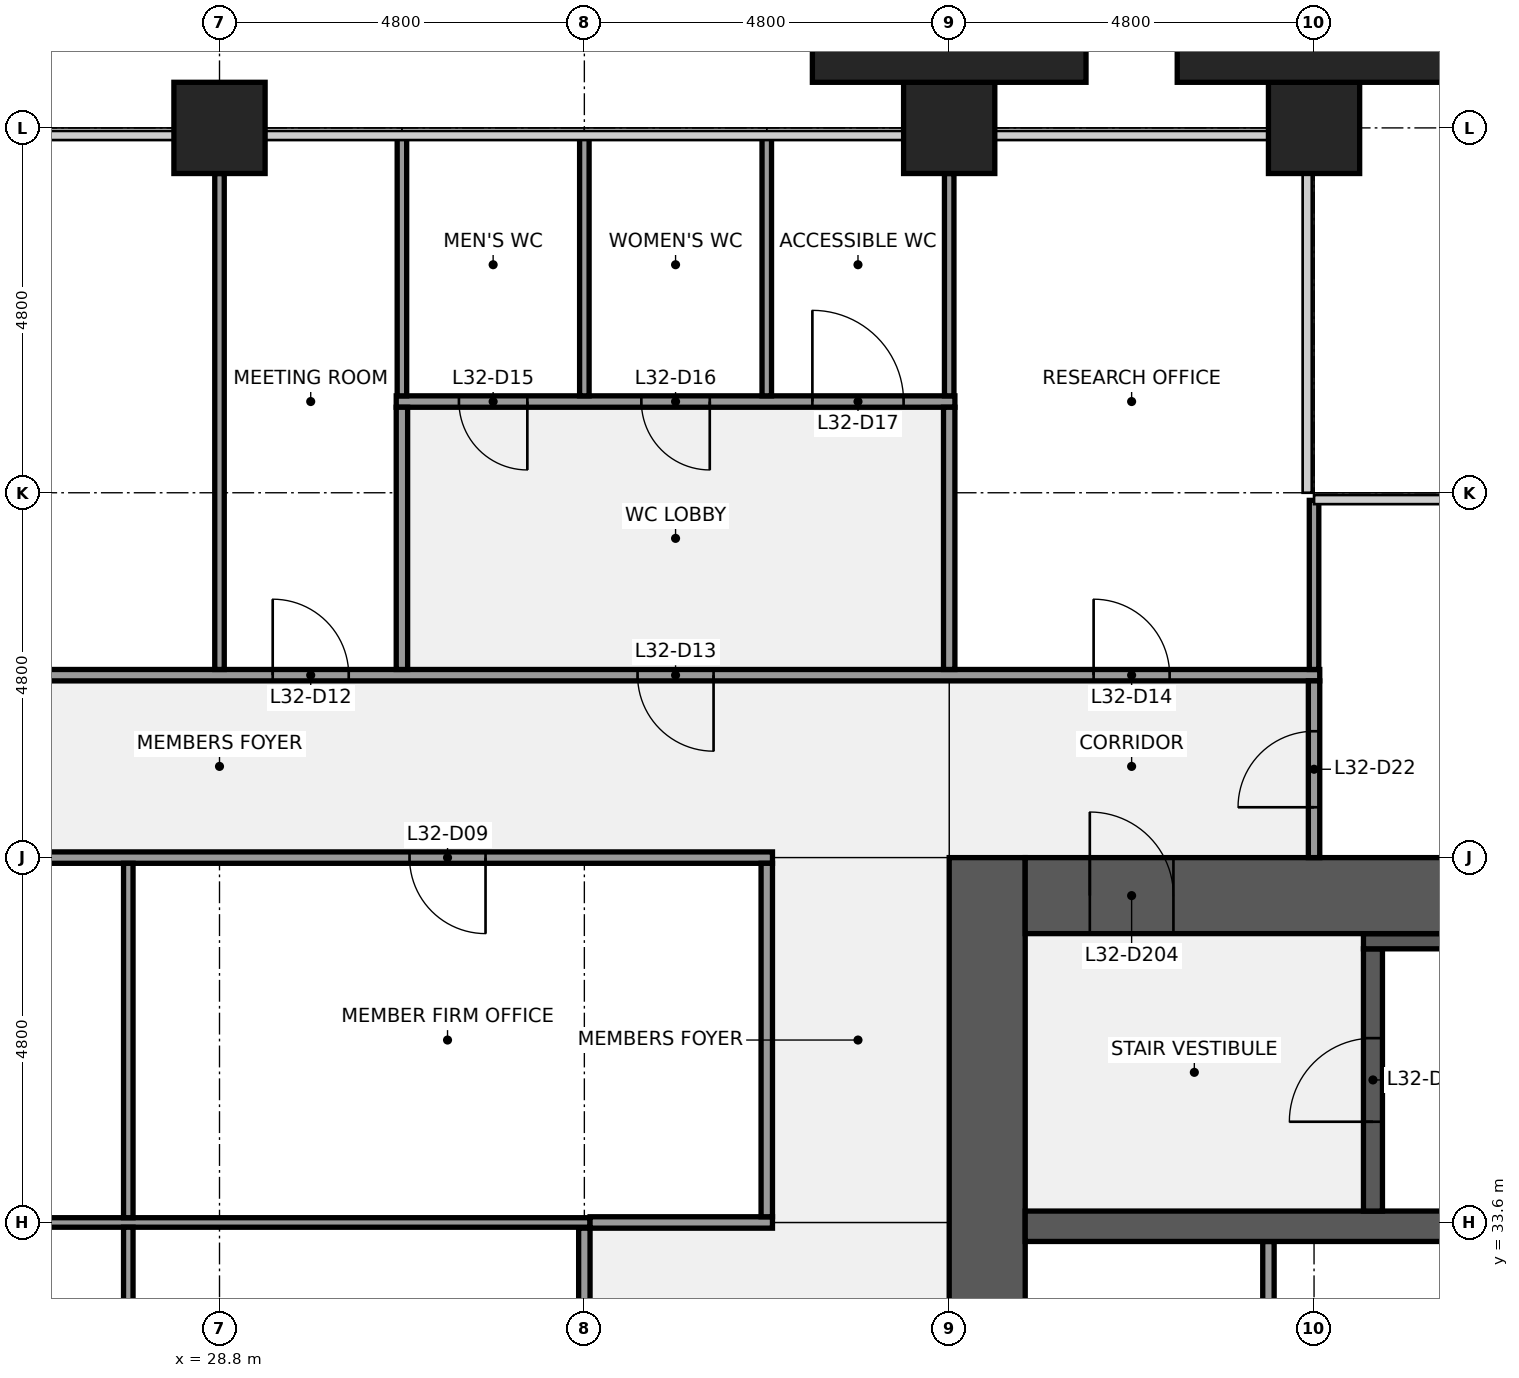
"""IFC4 building model, lengths in metres.
Left out: names, types, materials, properties, quantities, classifications, styles, units other than length and angle.
Written with IfcOpenShell. Run it as: python <this file> out.ifc"""

import sys

from ifc_helpers import new_model, si_unit, direction, frame, frame_2d, origin, origin_2d, place, context, subcontext, project, spatial, rectangle, extrude, element, fill, save


model = new_model("IFC4")
c1 = context("Model", 3, precision=1e-05, world=origin(), true_north=direction((0.0, 1.0)))
c2 = subcontext(c1, "Body", "Model", "MODEL_VIEW")
j1 = project(units=[si_unit("LENGTHUNIT", "METRE"), si_unit("PLANEANGLEUNIT", "RADIAN")], contexts=[c1])
p1 = place(None, origin())
s1 = spatial("IfcSite", under=j1, at=p1, CompositionType="ELEMENT")
p2 = place(p1, origin())
s2 = spatial("IfcBuilding", under=s1, at=p2, CompositionType="ELEMENT")
p3 = place(p2, frame((0.0, 0.0, 148.1)))
s3 = spatial("IfcBuildingStorey", under=s2, at=p3, CompositionType="ELEMENT", Elevation=148.1)
for number, where, z_axis, x_axis in (
    (1, (28.8, 48.0, 0.0), (0.0, 0.0, 1.0), (1.0, 0.0, 0.0)),
    (2, (38.4, 48.0, 0.0), (0.0, 0.0, 1.0), (1.0, 0.0, 0.0)),
    (3, (43.2, 48.0, 0.0), (0.0, 0.0, 1.0), (1.0, 0.0, 0.0)),
):
    element("IfcColumn", number, at=place(p3, frame(where, z_axis=z_axis, x_axis=x_axis)), inside=s3, PredefinedType="COLUMN", context=c2, shape_type="SweptSolid", body=[
        extrude(rectangle(XDim=1.2, YDim=1.2, at=origin_2d()), origin(), (0.0, 0.0, 1.0), 4.0),
    ])
p4 = place(p3, frame((38.9, 9.6, 0.0), z_axis=(0.0, 0.0, 1.0), x_axis=(0.0, 1.0, 0.0)))
e4 = element("IfcWall", 4, at=p4, inside=s3, PredefinedType="SHEAR", context=c2, shape_type="SweptSolid", body=[
    extrude(rectangle(XDim=28.8, YDim=1.0, at=frame_2d((14.4, 0.0))), origin(), (0.0, 0.0, 1.0), 3.84),
])
p5 = place(p4, frame((8.7, 0.0, 0.0)))
e5 = element("IfcOpeningElement", 5, at=p5, cuts=e4, PredefinedType="OPENING", context=c2, shape_type="SweptSolid", body=[
    extrude(rectangle(XDim=1.8, YDim=2.1, at=frame_2d((0.9, 1.05))), frame((0.0, 0.51, 0.0), z_axis=(0.0, -1.0, 0.0), x_axis=(1.0, 0.0, 0.0)), (0.0, 0.0, 1.0), 1.02),
])
p6 = place(p4, frame((18.3, 0.0, 0.0)))
e6 = element("IfcOpeningElement", 6, at=p6, cuts=e4, PredefinedType="OPENING", context=c2, shape_type="SweptSolid", body=[
    extrude(rectangle(XDim=1.8, YDim=2.1, at=frame_2d((0.9, 1.05))), frame((0.0, 0.51, 0.0), z_axis=(0.0, -1.0, 0.0), x_axis=(1.0, 0.0, 0.0)), (0.0, 0.0, 1.0), 1.02),
])
p7 = place(p3, frame((42.6, 30.75, 0.0), z_axis=(0.0, 0.0, 1.0), x_axis=(0.0, 1.0, 0.0)))
e7 = element("IfcWall", 7, at=p7, inside=s3, PredefinedType="PARTITIONING", context=c2, shape_type="SweptSolid", body=[
    extrude(rectangle(XDim=2.6, YDim=0.15, at=frame_2d((1.3, 0.0))), origin(), (0.0, 0.0, 1.0), 3.84),
])
p8 = place(p3, frame((39.4, 33.55, 0.0), z_axis=(0.0, 0.0, 1.0), x_axis=(1.0, 0.0, 0.0)))
e8 = element("IfcWall", 8, at=p8, inside=s3, PredefinedType="SHEAR", context=c2, shape_type="SweptSolid", body=[
    extrude(rectangle(XDim=17.2, YDim=0.4, at=frame_2d((8.6, 0.0))), origin(), (0.0, 0.0, 1.0), 3.84),
])
p9 = place(p3, frame((43.975, 33.75, 0.0), z_axis=(0.0, 0.0, 1.0), x_axis=(0.0, 1.0, 0.0)))
e9 = element("IfcWall", 9, at=p9, inside=s3, PredefinedType="SHEAR", context=c2, shape_type="SweptSolid", body=[
    extrude(rectangle(XDim=3.45, YDim=0.25, at=frame_2d((1.725, 0.0))), origin(), (0.0, 0.0, 1.0), 3.84),
])
p10 = place(p9, frame((1.175, 0.0, 0.0)))
e10 = element("IfcOpeningElement", 10, at=p10, cuts=e9, PredefinedType="OPENING", context=c2, shape_type="SweptSolid", body=[
    extrude(rectangle(XDim=1.1, YDim=2.1, at=frame_2d((0.55, 1.05))), frame((0.0, 0.135, 0.0), z_axis=(0.0, -1.0, 0.0), x_axis=(1.0, 0.0, 0.0)), (0.0, 0.0, 1.0), 0.27),
])
p11 = place(p3, frame((43.85, 37.3, 0.0), z_axis=(0.0, 0.0, 1.0), x_axis=(1.0, 0.0, 0.0)))
e11 = element("IfcWall", 11, at=p11, inside=s3, PredefinedType="SHEAR", context=c2, shape_type="SweptSolid", body=[
    extrude(rectangle(XDim=4.15, YDim=0.2, at=frame_2d((2.075, 0.0))), origin(), (0.0, 0.0, 1.0), 3.84),
])
p12 = place(p3, frame((39.4, 37.9, 0.0), z_axis=(0.0, 0.0, 1.0), x_axis=(1.0, 0.0, 0.0)))
e12 = element("IfcWall", 12, at=p12, inside=s3, PredefinedType="SHEAR", context=c2, shape_type="SweptSolid", body=[
    extrude(rectangle(XDim=8.6, YDim=1.0, at=frame_2d((4.3, 0.0))), origin(), (0.0, 0.0, 1.0), 3.84),
])
p13 = place(p12, frame((0.85, 0.0, 0.0)))
e13 = element("IfcOpeningElement", 13, at=p13, cuts=e12, PredefinedType="OPENING", context=c2, shape_type="SweptSolid", body=[
    extrude(rectangle(XDim=1.1, YDim=2.1, at=frame_2d((0.55, 1.05))), frame((0.0, 0.51, 0.0), z_axis=(0.0, -1.0, 0.0), x_axis=(1.0, 0.0, 0.0)), (0.0, 0.0, 1.0), 1.02),
])
p14 = place(p3, frame((24.075, 33.6, 0.0), z_axis=(0.0, 0.0, 1.0), x_axis=(1.0, 0.0, 0.0)))
e14 = element("IfcWall", 14, at=p14, inside=s3, PredefinedType="PARTITIONING", context=c2, shape_type="SweptSolid", body=[
    extrude(rectangle(XDim=9.6, YDim=0.125, at=frame_2d((4.8, 0.0))), origin(), (0.0, 0.0, 1.0), 2.849),
])
p15 = place(p3, frame((33.675, 33.6, 0.0), z_axis=(0.0, 0.0, 1.0), x_axis=(1.0, 0.0, 0.0)))
e15 = element("IfcWall", 15, at=p15, inside=s3, PredefinedType="PARTITIONING", context=c2, shape_type="SweptSolid", body=[
    extrude(rectangle(XDim=2.4, YDim=0.15, at=frame_2d((1.2, 0.0))), origin(), (0.0, 0.0, 1.0), 2.849),
])
p16 = place(p3, frame((21.525, 38.4, 0.0), z_axis=(0.0, 0.0, 1.0), x_axis=(1.0, 0.0, 0.0)))
e16 = element("IfcWall", 16, at=p16, inside=s3, PredefinedType="PARTITIONING", context=c2, shape_type="SweptSolid", body=[
    extrude(rectangle(XDim=14.55, YDim=0.15, at=frame_2d((7.275, 0.0))), origin(), (0.0, 0.0, 1.0), 2.849),
])
p17 = place(p16, frame((2.575, 0.0, 0.0)))
e17 = element("IfcOpeningElement", 17, at=p17, cuts=e16, PredefinedType="OPENING", context=c2, shape_type="SweptSolid", body=[
    extrude(rectangle(XDim=1.0, YDim=2.1, at=frame_2d((0.5, 1.05))), frame((0.0, 0.085, 0.0), z_axis=(0.0, -1.0, 0.0), x_axis=(1.0, 0.0, 0.0)), (0.0, 0.0, 1.0), 0.17),
])
p18 = place(p16, frame((9.775, 0.0, 0.0)))
e18 = element("IfcOpeningElement", 18, at=p18, cuts=e16, PredefinedType="OPENING", context=c2, shape_type="SweptSolid", body=[
    extrude(rectangle(XDim=1.0, YDim=2.1, at=frame_2d((0.5, 1.05))), frame((0.0, 0.085, 0.0), z_axis=(0.0, -1.0, 0.0), x_axis=(1.0, 0.0, 0.0)), (0.0, 0.0, 1.0), 0.17),
])
p19 = place(p3, frame((14.325, 40.8, 0.0), z_axis=(0.0, 0.0, 1.0), x_axis=(1.0, 0.0, 0.0)))
e19 = element("IfcWall", 19, at=p19, inside=s3, PredefinedType="PARTITIONING", context=c2, shape_type="SweptSolid", body=[
    extrude(rectangle(XDim=28.95, YDim=0.15, at=frame_2d((14.475, 0.0))), origin(), (0.0, 0.0, 1.0), 2.849),
])
p20 = place(p19, frame((1.975, 0.0, 0.0)))
e20 = element("IfcOpeningElement", 20, at=p20, cuts=e19, PredefinedType="OPENING", context=c2, shape_type="SweptSolid", body=[
    extrude(rectangle(XDim=1.0, YDim=2.1, at=frame_2d((0.5, 1.05))), frame((0.0, 0.085, 0.0), z_axis=(0.0, -1.0, 0.0), x_axis=(1.0, 0.0, 0.0)), (0.0, 0.0, 1.0), 0.17),
])
p21 = place(p19, frame((9.175, 0.0, 0.0)))
e21 = element("IfcOpeningElement", 21, at=p21, cuts=e19, PredefinedType="OPENING", context=c2, shape_type="SweptSolid", body=[
    extrude(rectangle(XDim=1.0, YDim=2.1, at=frame_2d((0.5, 1.05))), frame((0.0, 0.085, 0.0), z_axis=(0.0, -1.0, 0.0), x_axis=(1.0, 0.0, 0.0)), (0.0, 0.0, 1.0), 0.17),
])
p22 = place(p19, frame((15.175, 0.0, 0.0)))
e22 = element("IfcOpeningElement", 22, at=p22, cuts=e19, PredefinedType="OPENING", context=c2, shape_type="SweptSolid", body=[
    extrude(rectangle(XDim=1.0, YDim=2.1, at=frame_2d((0.5, 1.05))), frame((0.0, 0.085, 0.0), z_axis=(0.0, -1.0, 0.0), x_axis=(1.0, 0.0, 0.0)), (0.0, 0.0, 1.0), 0.17),
])
p23 = place(p19, frame((19.975, 0.0, 0.0)))
e23 = element("IfcOpeningElement", 23, at=p23, cuts=e19, PredefinedType="OPENING", context=c2, shape_type="SweptSolid", body=[
    extrude(rectangle(XDim=1.0, YDim=2.1, at=frame_2d((0.5, 1.05))), frame((0.0, 0.085, 0.0), z_axis=(0.0, -1.0, 0.0), x_axis=(1.0, 0.0, 0.0)), (0.0, 0.0, 1.0), 0.17),
])
p24 = place(p19, frame((25.975, 0.0, 0.0)))
e24 = element("IfcOpeningElement", 24, at=p24, cuts=e19, PredefinedType="OPENING", context=c2, shape_type="SweptSolid", body=[
    extrude(rectangle(XDim=1.0, YDim=2.1, at=frame_2d((0.5, 1.05))), frame((0.0, 0.085, 0.0), z_axis=(0.0, -1.0, 0.0), x_axis=(1.0, 0.0, 0.0)), (0.0, 0.0, 1.0), 0.17),
])
p25 = place(p3, frame((31.125, 44.4, 0.0), z_axis=(0.0, 0.0, 1.0), x_axis=(1.0, 0.0, 0.0)))
e25 = element("IfcWall", 25, at=p25, inside=s3, PredefinedType="PARTITIONING", context=c2, shape_type="SweptSolid", body=[
    extrude(rectangle(XDim=7.35, YDim=0.15, at=frame_2d((3.675, 0.0))), origin(), (0.0, 0.0, 1.0), 2.849),
])
p26 = place(p25, frame((0.825, 0.0, 0.0)))
e26 = element("IfcOpeningElement", 26, at=p26, cuts=e25, PredefinedType="OPENING", context=c2, shape_type="SweptSolid", body=[
    extrude(rectangle(XDim=0.9, YDim=2.1, at=frame_2d((0.45, 1.05))), frame((0.0, 0.085, 0.0), z_axis=(0.0, -1.0, 0.0), x_axis=(1.0, 0.0, 0.0)), (0.0, 0.0, 1.0), 0.17),
])
p27 = place(p25, frame((3.225, 0.0, 0.0)))
e27 = element("IfcOpeningElement", 27, at=p27, cuts=e25, PredefinedType="OPENING", context=c2, shape_type="SweptSolid", body=[
    extrude(rectangle(XDim=0.9, YDim=2.1, at=frame_2d((0.45, 1.05))), frame((0.0, 0.085, 0.0), z_axis=(0.0, -1.0, 0.0), x_axis=(1.0, 0.0, 0.0)), (0.0, 0.0, 1.0), 0.17),
])
p28 = place(p25, frame((5.475, 0.0, 0.0)))
e28 = element("IfcOpeningElement", 28, at=p28, cuts=e25, PredefinedType="OPENING", context=c2, shape_type="SweptSolid", body=[
    extrude(rectangle(XDim=1.2, YDim=2.1, at=frame_2d((0.6, 1.05))), frame((0.0, 0.085, 0.0), z_axis=(0.0, -1.0, 0.0), x_axis=(1.0, 0.0, 0.0)), (0.0, 0.0, 1.0), 0.17),
])
p29 = place(p3, frame((27.6, 21.675, 0.0), z_axis=(0.0, 0.0, 1.0), x_axis=(0.0, 1.0, 0.0)))
e29 = element("IfcWall", 29, at=p29, inside=s3, PredefinedType="PARTITIONING", context=c2, shape_type="SweptSolid", body=[
    extrude(rectangle(XDim=11.863, YDim=0.125, at=frame_2d((5.931, 0.0))), origin(), (0.0, 0.0, 1.0), 2.849),
])
p30 = place(p3, frame((27.6, 33.663, 0.0), z_axis=(0.0, 0.0, 1.0), x_axis=(0.0, 1.0, 0.0)))
e30 = element("IfcWall", 30, at=p30, inside=s3, PredefinedType="PARTITIONING", context=c2, shape_type="SweptSolid", body=[
    extrude(rectangle(XDim=4.662, YDim=0.125, at=frame_2d((2.331, 0.0))), origin(), (0.0, 0.0, 1.0), 2.849),
])
p31 = place(p3, frame((28.8, 40.875, 0.0), z_axis=(0.0, 0.0, 1.0), x_axis=(0.0, 1.0, 0.0)))
e31 = element("IfcWall", 31, at=p31, inside=s3, PredefinedType="PARTITIONING", context=c2, shape_type="SweptSolid", body=[
    extrude(rectangle(XDim=6.525, YDim=0.125, at=frame_2d((3.262, 0.0))), origin(), (0.0, 0.0, 1.0), 2.849),
])
p32 = place(p3, frame((31.2, 44.475, 0.0), z_axis=(0.0, 0.0, 1.0), x_axis=(0.0, 1.0, 0.0)))
e32 = element("IfcWall", 32, at=p32, inside=s3, PredefinedType="PARTITIONING", context=c2, shape_type="SweptSolid", body=[
    extrude(rectangle(XDim=3.425, YDim=0.125, at=frame_2d((1.712, 0.0))), origin(), (0.0, 0.0, 1.0), 2.849),
])
p33 = place(p3, frame((31.2, 40.875, 0.0), z_axis=(0.0, 0.0, 1.0), x_axis=(0.0, 1.0, 0.0)))
e33 = element("IfcWall", 33, at=p33, inside=s3, PredefinedType="PARTITIONING", context=c2, shape_type="SweptSolid", body=[
    extrude(rectangle(XDim=3.45, YDim=0.15, at=frame_2d((1.725, 0.0))), origin(), (0.0, 0.0, 1.0), 2.849),
])
p34 = place(p3, frame((33.6, 44.475, 0.0), z_axis=(0.0, 0.0, 1.0), x_axis=(0.0, 1.0, 0.0)))
e34 = element("IfcWall", 34, at=p34, inside=s3, PredefinedType="PARTITIONING", context=c2, shape_type="SweptSolid", body=[
    extrude(rectangle(XDim=3.425, YDim=0.125, at=frame_2d((1.712, 0.0))), origin(), (0.0, 0.0, 1.0), 2.849),
])
p35 = place(p3, frame((33.6, 21.675, 0.0), z_axis=(0.0, 0.0, 1.0), x_axis=(0.0, 1.0, 0.0)))
e35 = element("IfcWall", 35, at=p35, inside=s3, PredefinedType="PARTITIONING", context=c2, shape_type="SweptSolid", body=[
    extrude(rectangle(XDim=11.85, YDim=0.15, at=frame_2d((5.925, 0.0))), origin(), (0.0, 0.0, 1.0), 2.849),
])
p36 = place(p35, frame((5.425, 0.0, 0.0)))
e36 = element("IfcOpeningElement", 36, at=p36, cuts=e35, PredefinedType="OPENING", context=c2, shape_type="SweptSolid", body=[
    extrude(rectangle(XDim=1.0, YDim=2.1, at=frame_2d((0.5, 1.05))), frame((0.0, 0.085, 0.0), z_axis=(0.0, -1.0, 0.0), x_axis=(1.0, 0.0, 0.0)), (0.0, 0.0, 1.0), 0.17),
])
p37 = place(p3, frame((36.0, 44.475, 0.0), z_axis=(0.0, 0.0, 1.0), x_axis=(0.0, 1.0, 0.0)))
e37 = element("IfcWall", 37, at=p37, inside=s3, PredefinedType="PARTITIONING", context=c2, shape_type="SweptSolid", body=[
    extrude(rectangle(XDim=3.425, YDim=0.125, at=frame_2d((1.712, 0.0))), origin(), (0.0, 0.0, 1.0), 2.849),
])
p38 = place(p3, frame((36.0, 33.675, 0.0), z_axis=(0.0, 0.0, 1.0), x_axis=(0.0, 1.0, 0.0)))
e38 = element("IfcWall", 38, at=p38, inside=s3, PredefinedType="PARTITIONING", context=c2, shape_type="SweptSolid", body=[
    extrude(rectangle(XDim=4.65, YDim=0.15, at=frame_2d((2.325, 0.0))), origin(), (0.0, 0.0, 1.0), 2.849),
])
p39 = place(p3, frame((38.4, 44.475, 0.0), z_axis=(0.0, 0.0, 1.0), x_axis=(0.0, 1.0, 0.0)))
e39 = element("IfcWall", 39, at=p39, inside=s3, PredefinedType="PARTITIONING", context=c2, shape_type="SweptSolid", body=[
    extrude(rectangle(XDim=2.925, YDim=0.125, at=frame_2d((1.462, 0.0))), origin(), (0.0, 0.0, 1.0), 2.849),
])
p40 = place(p3, frame((38.4, 40.875, 0.0), z_axis=(0.0, 0.0, 1.0), x_axis=(0.0, 1.0, 0.0)))
e40 = element("IfcWall", 40, at=p40, inside=s3, PredefinedType="PARTITIONING", context=c2, shape_type="SweptSolid", body=[
    extrude(rectangle(XDim=3.45, YDim=0.15, at=frame_2d((1.725, 0.0))), origin(), (0.0, 0.0, 1.0), 2.849),
])
p41 = place(p3, frame((43.2, 40.875, 0.0), z_axis=(0.0, 0.0, 1.0), x_axis=(0.0, 1.0, 0.0)))
e41 = element("IfcWall", 41, at=p41, inside=s3, PredefinedType="PARTITIONING", context=c2, shape_type="SweptSolid", body=[
    extrude(rectangle(XDim=2.225, YDim=0.125, at=frame_2d((1.113, 0.0))), origin(), (0.0, 0.0, 1.0), 2.849),
])
p42 = place(p3, frame((43.2, 38.4, 0.0), z_axis=(0.0, 0.0, 1.0), x_axis=(0.0, 1.0, 0.0)))
e42 = element("IfcWall", 42, at=p42, inside=s3, PredefinedType="PARTITIONING", context=c2, shape_type="SweptSolid", body=[
    extrude(rectangle(XDim=2.325, YDim=0.15, at=frame_2d((1.163, 0.0))), origin(), (0.0, 0.0, 1.0), 2.849),
])
p43 = place(p42, frame((0.663, 0.0, 0.0)))
e43 = element("IfcOpeningElement", 43, at=p43, cuts=e42, PredefinedType="OPENING", context=c2, shape_type="SweptSolid", body=[
    extrude(rectangle(XDim=1.0, YDim=2.1, at=frame_2d((0.5, 1.05))), frame((0.0, 0.085, 0.0), z_axis=(0.0, -1.0, 0.0), x_axis=(1.0, 0.0, 0.0)), (0.0, 0.0, 1.0), 0.17),
])
for number, where, z_axis, x_axis in (
    (44, (38.4, 49.05, 0.0), (0.0, 0.0, 1.0), (1.0, 0.0, 0.0)),
    (45, (43.2, 49.05, 0.0), (0.0, 0.0, 1.0), (1.0, 0.0, 0.0)),
):
    element("IfcColumn", number, at=place(p3, frame(where, z_axis=z_axis, x_axis=x_axis)), inside=s3, PredefinedType="PILASTER", context=c2, shape_type="SweptSolid", body=[
        extrude(rectangle(XDim=3.6, YDim=0.9, at=origin_2d()), origin(), (0.0, 0.0, 1.0), 4.0),
    ])
p44 = place(p10, origin())
e46 = element("IfcDoor", 46, at=p44, inside=s3, OperationType="SINGLE_SWING_LEFT", PredefinedType="DOOR", context=c2, shape_type="SweptSolid", body=[
    extrude(rectangle(XDim=1.1, YDim=2.1, at=frame_2d((0.55, 1.05))), frame((0.0, 0.025, 0.0), z_axis=(0.0, -1.0, 0.0), x_axis=(1.0, 0.0, 0.0)), (0.0, 0.0, 1.0), 0.05),
])
fill(e10, e46)
p45 = place(p13, origin())
e47 = element("IfcDoor", 47, at=p45, inside=s3, OperationType="SINGLE_SWING_LEFT", PredefinedType="DOOR", context=c2, shape_type="SweptSolid", body=[
    extrude(rectangle(XDim=1.1, YDim=2.1, at=frame_2d((0.55, 1.05))), frame((0.0, 0.025, 0.0), z_axis=(0.0, -1.0, 0.0), x_axis=(1.0, 0.0, 0.0)), (0.0, 0.0, 1.0), 0.05),
])
fill(e13, e47)
p46 = place(p18, origin())
e48 = element("IfcDoor", 48, at=p46, inside=s3, OperationType="SINGLE_SWING_RIGHT", PredefinedType="DOOR", context=c2, shape_type="SweptSolid", body=[
    extrude(rectangle(XDim=1.0, YDim=2.1, at=frame_2d((0.5, 1.05))), frame((0.0, 0.025, 0.0), z_axis=(0.0, -1.0, 0.0), x_axis=(1.0, 0.0, 0.0)), (0.0, 0.0, 1.0), 0.05),
])
fill(e18, e48)
p47 = place(p22, origin())
e49 = element("IfcDoor", 49, at=p47, inside=s3, OperationType="SINGLE_SWING_LEFT", PredefinedType="DOOR", context=c2, shape_type="SweptSolid", body=[
    extrude(rectangle(XDim=1.0, YDim=2.1, at=frame_2d((0.5, 1.05))), frame((0.0, 0.025, 0.0), z_axis=(0.0, -1.0, 0.0), x_axis=(1.0, 0.0, 0.0)), (0.0, 0.0, 1.0), 0.05),
])
fill(e22, e49)
p48 = place(p23, origin())
e50 = element("IfcDoor", 50, at=p48, inside=s3, OperationType="SINGLE_SWING_RIGHT", PredefinedType="DOOR", context=c2, shape_type="SweptSolid", body=[
    extrude(rectangle(XDim=1.0, YDim=2.1, at=frame_2d((0.5, 1.05))), frame((0.0, 0.025, 0.0), z_axis=(0.0, -1.0, 0.0), x_axis=(1.0, 0.0, 0.0)), (0.0, 0.0, 1.0), 0.05),
])
fill(e23, e50)
p49 = place(p24, origin())
e51 = element("IfcDoor", 51, at=p49, inside=s3, OperationType="SINGLE_SWING_LEFT", PredefinedType="DOOR", context=c2, shape_type="SweptSolid", body=[
    extrude(rectangle(XDim=1.0, YDim=2.1, at=frame_2d((0.5, 1.05))), frame((0.0, 0.025, 0.0), z_axis=(0.0, -1.0, 0.0), x_axis=(1.0, 0.0, 0.0)), (0.0, 0.0, 1.0), 0.05),
])
fill(e24, e51)
p50 = place(p26, origin())
e52 = element("IfcDoor", 52, at=p50, inside=s3, OperationType="SINGLE_SWING_RIGHT", PredefinedType="DOOR", context=c2, shape_type="SweptSolid", body=[
    extrude(rectangle(XDim=0.9, YDim=2.1, at=frame_2d((0.45, 1.05))), frame((0.0, 0.025, 0.0), z_axis=(0.0, -1.0, 0.0), x_axis=(1.0, 0.0, 0.0)), (0.0, 0.0, 1.0), 0.05),
])
fill(e26, e52)
p51 = place(p27, origin())
e53 = element("IfcDoor", 53, at=p51, inside=s3, OperationType="SINGLE_SWING_RIGHT", PredefinedType="DOOR", context=c2, shape_type="SweptSolid", body=[
    extrude(rectangle(XDim=0.9, YDim=2.1, at=frame_2d((0.45, 1.05))), frame((0.0, 0.025, 0.0), z_axis=(0.0, -1.0, 0.0), x_axis=(1.0, 0.0, 0.0)), (0.0, 0.0, 1.0), 0.05),
])
fill(e27, e53)
p52 = place(p28, origin())
e54 = element("IfcDoor", 54, at=p52, inside=s3, OperationType="SINGLE_SWING_LEFT", PredefinedType="DOOR", context=c2, shape_type="SweptSolid", body=[
    extrude(rectangle(XDim=1.2, YDim=2.1, at=frame_2d((0.6, 1.05))), frame((0.0, 0.025, 0.0), z_axis=(0.0, -1.0, 0.0), x_axis=(1.0, 0.0, 0.0)), (0.0, 0.0, 1.0), 0.05),
])
fill(e28, e54)
p53 = place(p43, origin())
e55 = element("IfcDoor", 55, at=p53, inside=s3, OperationType="SINGLE_SWING_LEFT", PredefinedType="DOOR", context=c2, shape_type="SweptSolid", body=[
    extrude(rectangle(XDim=1.0, YDim=2.1, at=frame_2d((0.5, 1.05))), frame((0.0, 0.025, 0.0), z_axis=(0.0, -1.0, 0.0), x_axis=(1.0, 0.0, 0.0)), (0.0, 0.0, 1.0), 0.05),
])
fill(e43, e55)
save(model, sys.argv[1])
